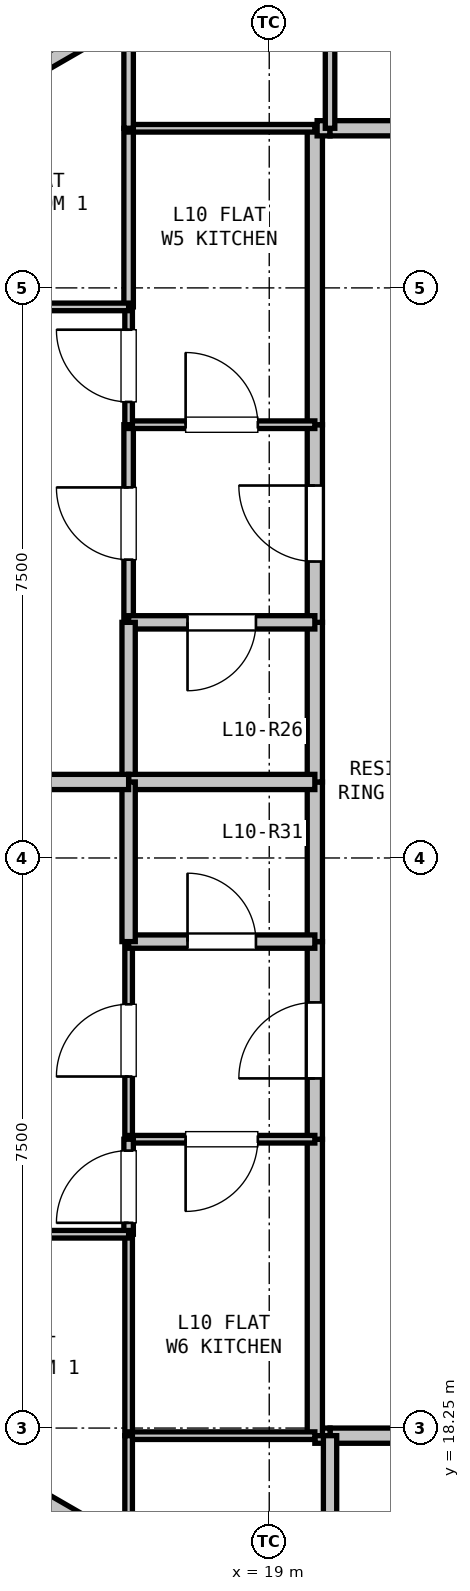
"""IFC4 building model, lengths in metres.
Left out: names, types, materials, properties, quantities, classifications, styles, units other than length and angle.
Written with IfcOpenShell. Run it as: python <this file> out.ifc"""

import sys

from ifc_helpers import new_model, si_unit, direction, frame, frame_2d, origin, place, context, subcontext, project, spatial, rectangle, extrude, element, fill, save


model = new_model("IFC4")
c1 = context("Model", 3, precision=1e-05, world=origin(), true_north=direction((0.0, 1.0)))
c2 = subcontext(c1, "Body", "Model", "MODEL_VIEW")
j1 = project(units=[si_unit("LENGTHUNIT", "METRE"), si_unit("PLANEANGLEUNIT", "RADIAN")], contexts=[c1])
p1 = place(None, origin())
s1 = spatial("IfcSite", under=j1, at=p1, CompositionType="ELEMENT")
p2 = place(p1, origin())
s2 = spatial("IfcBuilding", under=s1, at=p2, CompositionType="ELEMENT")
p3 = place(p2, frame((0.0, 0.0, 39.0)))
s3 = spatial("IfcBuildingStorey", under=s2, at=p3, CompositionType="ELEMENT", Elevation=39.0)
for number, where, z_axis, x_axis in (
    (1, (15.008, 35.611, 0.0), (0.0, 0.0, 1.0), (0.866, 0.5, 0.0)),
    (2, (16.48, 17.039, 0.0), (0.0, 0.0, 1.0), (-0.866, 0.5, 0.0)),
):
    element("IfcWall", number, at=place(p3, frame(where, z_axis=z_axis, x_axis=x_axis)), inside=s3, PredefinedType="PARAPET", context=c2, shape_type="SweptSolid", body=[
        extrude(rectangle(XDim=1.7, YDim=0.2, at=frame_2d((0.85, 0.0))), origin(), (0.0, 0.0, 1.0), 2.66),
    ])
p4 = place(p3, frame((21.8, 18.15, 0.0), z_axis=(0.0, 0.0, 1.0), x_axis=(-1.0, 0.0, 0.0)))
e3 = element("IfcWall", 3, at=p4, inside=s3, PredefinedType="PARTITIONING", context=c2, shape_type="SweptSolid", body=[
    extrude(rectangle(XDim=2.0, YDim=0.2, at=frame_2d((1.0, 0.0))), origin(), (0.0, 0.0, 1.0), 3.04),
])
p5 = place(p3, frame((19.8, 18.15, 0.0), z_axis=(0.0, 0.0, 1.0), x_axis=(-1.0, 0.0, 0.0)))
e4 = element("IfcWall", 4, at=p5, inside=s3, PredefinedType="PARTITIONING", context=c2, shape_type="SweptSolid", body=[
    extrude(rectangle(XDim=0.2, YDim=0.2, at=frame_2d((0.1, 0.0))), origin(), (0.0, 0.0, 1.0), 3.04),
])
p6 = place(p3, frame((19.6, 18.15, 0.0), z_axis=(0.0, 0.0, 1.0), x_axis=(0.0, 1.0, 0.0)))
e5 = element("IfcWall", 5, at=p6, inside=s3, PredefinedType="PARTITIONING", context=c2, shape_type="SweptSolid", body=[
    extrude(rectangle(XDim=3.9, YDim=0.2, at=frame_2d((1.95, 0.0))), origin(), (0.0, 0.0, 1.0), 2.337),
])
p7 = place(p3, frame((19.6, 22.05, 0.0), z_axis=(0.0, 0.0, 1.0), x_axis=(0.0, 1.0, 0.0)))
e6 = element("IfcWall", 6, at=p7, inside=s3, PredefinedType="PARTITIONING", context=c2, shape_type="SweptSolid", body=[
    extrude(rectangle(XDim=2.6, YDim=0.2, at=frame_2d((1.3, 0.0))), origin(), (0.0, 0.0, 1.0), 3.04),
])
p8 = place(p7, frame((0.8, 0.0, 0.0)))
e7 = element("IfcOpeningElement", 7, at=p8, cuts=e6, PredefinedType="OPENING", context=c2, shape_type="SweptSolid", body=[
    extrude(rectangle(XDim=1.0, YDim=2.15, at=frame_2d((0.5, 1.075))), frame((0.0, 0.11, 0.0), z_axis=(0.0, -1.0, 0.0), x_axis=(1.0, 0.0, 0.0)), (0.0, 0.0, 1.0), 0.22),
])
for number, where, z_axis, x_axis in (
    (8, (19.6, 24.65, 0.0), (0.0, 0.0, 1.0), (0.0, 1.0, 0.0)),
    (9, (19.6, 26.75, 0.0), (0.0, 0.0, 1.0), (0.0, 1.0, 0.0)),
):
    element("IfcWall", number, at=place(p3, frame(where, z_axis=z_axis, x_axis=x_axis)), inside=s3, PredefinedType="PARTITIONING", context=c2, shape_type="SweptSolid", body=[
        extrude(rectangle(XDim=2.1, YDim=0.2, at=frame_2d((1.05, 0.0))), origin(), (0.0, 0.0, 1.0), 3.04),
    ])
p9 = place(p3, frame((19.6, 28.85, 0.0), z_axis=(0.0, 0.0, 1.0), x_axis=(0.0, 1.0, 0.0)))
e10 = element("IfcWall", 10, at=p9, inside=s3, PredefinedType="PARTITIONING", context=c2, shape_type="SweptSolid", body=[
    extrude(rectangle(XDim=2.6, YDim=0.2, at=frame_2d((1.3, 0.0))), origin(), (0.0, 0.0, 1.0), 3.04),
])
p10 = place(p9, frame((0.8, 0.0, 0.0)))
e11 = element("IfcOpeningElement", 11, at=p10, cuts=e10, PredefinedType="OPENING", context=c2, shape_type="SweptSolid", body=[
    extrude(rectangle(XDim=1.0, YDim=2.15, at=frame_2d((0.5, 1.075))), frame((0.0, 0.11, 0.0), z_axis=(0.0, -1.0, 0.0), x_axis=(1.0, 0.0, 0.0)), (0.0, 0.0, 1.0), 0.22),
])
p11 = place(p3, frame((19.6, 31.45, 0.0), z_axis=(0.0, 0.0, 1.0), x_axis=(0.0, 1.0, 0.0)))
e12 = element("IfcWall", 12, at=p11, inside=s3, PredefinedType="PARTITIONING", context=c2, shape_type="SweptSolid", body=[
    extrude(rectangle(XDim=3.9, YDim=0.2, at=frame_2d((1.95, 0.0))), origin(), (0.0, 0.0, 1.0), 2.337),
])
p12 = place(p3, frame((19.63, 35.35, 0.0), z_axis=(0.0, 0.0, 1.0), x_axis=(1.0, 0.0, 0.0)))
e13 = element("IfcWall", 13, at=p12, inside=s3, PredefinedType="PARTITIONING", context=c2, shape_type="SweptSolid", body=[
    extrude(rectangle(XDim=0.17, YDim=0.2, at=frame_2d((0.085, 0.0))), origin(), (0.0, 0.0, 1.0), 3.04),
])
p13 = place(p3, frame((19.8, 35.35, 0.0), z_axis=(0.0, 0.0, 1.0), x_axis=(1.0, 0.0, 0.0)))
e14 = element("IfcWall", 14, at=p13, inside=s3, PredefinedType="PARTITIONING", context=c2, shape_type="SweptSolid", body=[
    extrude(rectangle(XDim=3.0, YDim=0.2, at=frame_2d((1.5, 0.0))), origin(), (0.0, 0.0, 1.0), 3.04),
])
p14 = place(p3, frame((17.15, 28.85, 0.0), z_axis=(0.0, 0.0, 1.0), x_axis=(0.0, 1.0, 0.0)))
e15 = element("IfcWall", 15, at=p14, inside=s3, PredefinedType="PARTITIONING", context=c2, shape_type="SweptSolid", body=[
    extrude(rectangle(XDim=2.6, YDim=0.125, at=frame_2d((1.3, 0.0))), origin(), (0.0, 0.0, 1.0), 3.04),
])
p15 = place(p14, frame((0.825, 0.0, 0.0)))
e16 = element("IfcOpeningElement", 16, at=p15, cuts=e15, PredefinedType="OPENING", context=c2, shape_type="SweptSolid", body=[
    extrude(rectangle(XDim=0.95, YDim=2.1, at=frame_2d((0.475, 1.05))), frame((0.0, 0.073, 0.0), z_axis=(0.0, -1.0, 0.0), x_axis=(1.0, 0.0, 0.0)), (0.0, 0.0, 1.0), 0.145),
])
p16 = place(p3, frame((17.15, 31.45, 0.0), z_axis=(0.0, 0.0, 1.0), x_axis=(1.0, 0.0, 0.0)))
e17 = element("IfcWall", 17, at=p16, inside=s3, PredefinedType="PARTITIONING", context=c2, shape_type="SweptSolid", body=[
    extrude(rectangle(XDim=2.45, YDim=0.1, at=frame_2d((1.225, 0.0))), origin(), (0.0, 0.0, 1.0), 3.04),
])
p17 = place(p16, frame((0.75, 0.0, 0.0)))
e18 = element("IfcOpeningElement", 18, at=p17, cuts=e17, PredefinedType="OPENING", context=c2, shape_type="SweptSolid", body=[
    extrude(rectangle(XDim=0.95, YDim=2.1, at=frame_2d((0.475, 1.05))), frame((0.0, 0.06, 0.0), z_axis=(0.0, -1.0, 0.0), x_axis=(1.0, 0.0, 0.0)), (0.0, 0.0, 1.0), 0.12),
])
p18 = place(p3, frame((19.6, 28.85, 0.0), z_axis=(0.0, 0.0, 1.0), x_axis=(-1.0, 0.0, 0.0)))
e19 = element("IfcWall", 19, at=p18, inside=s3, PredefinedType="PLUMBINGWALL", context=c2, shape_type="SweptSolid", body=[
    extrude(rectangle(XDim=2.45, YDim=0.175, at=frame_2d((1.225, 0.0))), origin(), (0.0, 0.0, 1.0), 3.04),
])
p19 = place(p18, frame((0.775, 0.0, 0.0)))
e20 = element("IfcOpeningElement", 20, at=p19, cuts=e19, PredefinedType="OPENING", context=c2, shape_type="SweptSolid", body=[
    extrude(rectangle(XDim=0.9, YDim=2.1, at=frame_2d((0.45, 1.05))), frame((0.0, 0.097, 0.0), z_axis=(0.0, -1.0, 0.0), x_axis=(1.0, 0.0, 0.0)), (0.0, 0.0, 1.0), 0.195),
])
p20 = place(p3, frame((17.15, 22.05, 0.0), z_axis=(0.0, 0.0, 1.0), x_axis=(0.0, 1.0, 0.0)))
e21 = element("IfcWall", 21, at=p20, inside=s3, PredefinedType="PARTITIONING", context=c2, shape_type="SweptSolid", body=[
    extrude(rectangle(XDim=2.6, YDim=0.1, at=frame_2d((1.3, 0.0))), origin(), (0.0, 0.0, 1.0), 3.04),
])
p21 = place(p20, frame((0.825, 0.0, 0.0)))
e22 = element("IfcOpeningElement", 22, at=p21, cuts=e21, PredefinedType="OPENING", context=c2, shape_type="SweptSolid", body=[
    extrude(rectangle(XDim=0.95, YDim=2.1, at=frame_2d((0.475, 1.05))), frame((0.0, 0.06, 0.0), z_axis=(0.0, -1.0, 0.0), x_axis=(1.0, 0.0, 0.0)), (0.0, 0.0, 1.0), 0.12),
])
p22 = place(p3, frame((17.15, 24.65, 0.0), z_axis=(0.0, 0.0, 1.0), x_axis=(1.0, 0.0, 0.0)))
e23 = element("IfcWall", 23, at=p22, inside=s3, PredefinedType="PLUMBINGWALL", context=c2, shape_type="SweptSolid", body=[
    extrude(rectangle(XDim=2.45, YDim=0.175, at=frame_2d((1.225, 0.0))), origin(), (0.0, 0.0, 1.0), 3.04),
])
p23 = place(p22, frame((0.775, 0.0, 0.0)))
e24 = element("IfcOpeningElement", 24, at=p23, cuts=e23, PredefinedType="OPENING", context=c2, shape_type="SweptSolid", body=[
    extrude(rectangle(XDim=0.9, YDim=2.1, at=frame_2d((0.45, 1.05))), frame((0.0, 0.097, 0.0), z_axis=(0.0, -1.0, 0.0), x_axis=(1.0, 0.0, 0.0)), (0.0, 0.0, 1.0), 0.195),
])
p24 = place(p3, frame((19.6, 22.05, 0.0), z_axis=(0.0, 0.0, 1.0), x_axis=(-1.0, 0.0, 0.0)))
e25 = element("IfcWall", 25, at=p24, inside=s3, PredefinedType="PARTITIONING", context=c2, shape_type="SweptSolid", body=[
    extrude(rectangle(XDim=2.45, YDim=0.1, at=frame_2d((1.225, 0.0))), origin(), (0.0, 0.0, 1.0), 3.04),
])
p25 = place(p24, frame((0.75, 0.0, 0.0)))
e26 = element("IfcOpeningElement", 26, at=p25, cuts=e25, PredefinedType="OPENING", context=c2, shape_type="SweptSolid", body=[
    extrude(rectangle(XDim=0.95, YDim=2.1, at=frame_2d((0.475, 1.05))), frame((0.0, 0.06, 0.0), z_axis=(0.0, -1.0, 0.0), x_axis=(1.0, 0.0, 0.0)), (0.0, 0.0, 1.0), 0.12),
])
p26 = place(p3, frame((19.8, 35.35, 0.0), z_axis=(0.0, 0.0, 1.0), x_axis=(0.0, 1.0, 0.0)))
e27 = element("IfcWall", 27, at=p26, inside=s3, PredefinedType="PARTITIONING", context=c2, shape_type="SweptSolid", body=[
    extrude(rectangle(XDim=3.194, YDim=0.125, at=frame_2d((1.597, 0.0))), origin(), (0.0, 0.0, 1.0), 2.365),
])
p27 = place(p3, frame((19.8, 14.956, 0.0), z_axis=(0.0, 0.0, 1.0), x_axis=(0.0, 1.0, 0.0)))
e28 = element("IfcWall", 28, at=p27, inside=s3, PredefinedType="PLUMBINGWALL", context=c2, shape_type="SweptSolid", body=[
    extrude(rectangle(XDim=3.194, YDim=0.175, at=frame_2d((1.597, 0.0))), origin(), (0.0, 0.0, 1.0), 2.365),
])
p28 = place(p3, frame((17.15, 26.75, 0.0), z_axis=(0.0, 0.0, 1.0), x_axis=(0.0, 1.0, 0.0)))
e29 = element("IfcWall", 29, at=p28, inside=s3, PredefinedType="PLUMBINGWALL", context=c2, shape_type="SweptSolid", body=[
    extrude(rectangle(XDim=2.1, YDim=0.175, at=frame_2d((1.05, 0.0))), origin(), (0.0, 0.0, 1.0), 3.04),
])
p29 = place(p3, frame((19.6, 26.75, 0.0), z_axis=(0.0, 0.0, 1.0), x_axis=(-1.0, 0.0, 0.0)))
e30 = element("IfcWall", 30, at=p29, inside=s3, PredefinedType="PARTITIONING", context=c2, shape_type="SweptSolid", body=[
    extrude(rectangle(XDim=2.45, YDim=0.2, at=frame_2d((1.225, 0.0))), origin(), (0.0, 0.0, 1.0), 3.04),
])
p30 = place(p3, frame((17.15, 31.45, 0.0), z_axis=(0.0, 0.0, 1.0), x_axis=(0.0, 1.0, 0.0)))
e31 = element("IfcWall", 31, at=p30, inside=s3, PredefinedType="PARTITIONING", context=c2, shape_type="SweptSolid", body=[
    extrude(rectangle(XDim=1.55, YDim=0.1, at=frame_2d((0.775, 0.0))), origin(), (0.0, 0.0, 1.0), 2.337),
])
p31 = place(p30, frame((0.3, 0.0, 0.0)))
e32 = element("IfcOpeningElement", 32, at=p31, cuts=e31, PredefinedType="OPENING", context=c2, shape_type="SweptSolid", body=[
    extrude(rectangle(XDim=0.95, YDim=2.1, at=frame_2d((0.475, 1.05))), frame((0.0, 0.06, 0.0), z_axis=(0.0, -1.0, 0.0), x_axis=(1.0, 0.0, 0.0)), (0.0, 0.0, 1.0), 0.12),
])
p32 = place(p3, frame((17.15, 33.0, 0.0), z_axis=(0.0, 0.0, 1.0), x_axis=(0.0, 1.0, 0.0)))
e33 = element("IfcWall", 33, at=p32, inside=s3, PredefinedType="PARTITIONING", context=c2, shape_type="SweptSolid", body=[
    extrude(rectangle(XDim=2.35, YDim=0.125, at=frame_2d((1.175, 0.0))), origin(), (0.0, 0.0, 1.0), 3.04),
])
p33 = place(p3, frame((17.15, 35.35, 0.0), z_axis=(0.0, 0.0, 1.0), x_axis=(1.0, 0.0, 0.0)))
e34 = element("IfcWall", 34, at=p33, inside=s3, PredefinedType="PARTITIONING", context=c2, shape_type="SweptSolid", body=[
    extrude(rectangle(XDim=2.45, YDim=0.1, at=frame_2d((1.225, 0.0))), origin(), (0.0, 0.0, 1.0), 3.04),
])
p34 = place(p3, frame((17.15, 24.65, 0.0), z_axis=(0.0, 0.0, 1.0), x_axis=(0.0, 1.0, 0.0)))
e35 = element("IfcWall", 35, at=p34, inside=s3, PredefinedType="PLUMBINGWALL", context=c2, shape_type="SweptSolid", body=[
    extrude(rectangle(XDim=2.1, YDim=0.175, at=frame_2d((1.05, 0.0))), origin(), (0.0, 0.0, 1.0), 3.04),
])
p35 = place(p3, frame((17.15, 18.15, 0.0), z_axis=(0.0, 0.0, 1.0), x_axis=(0.0, 1.0, 0.0)))
e36 = element("IfcWall", 36, at=p35, inside=s3, PredefinedType="PARTITIONING", context=c2, shape_type="SweptSolid", body=[
    extrude(rectangle(XDim=2.65, YDim=0.1, at=frame_2d((1.325, 0.0))), origin(), (0.0, 0.0, 1.0), 3.04),
])
p36 = place(p3, frame((17.15, 20.8, 0.0), z_axis=(0.0, 0.0, 1.0), x_axis=(0.0, 1.0, 0.0)))
e37 = element("IfcWall", 37, at=p36, inside=s3, PredefinedType="PARTITIONING", context=c2, shape_type="SweptSolid", body=[
    extrude(rectangle(XDim=1.25, YDim=0.125, at=frame_2d((0.625, 0.0))), origin(), (0.0, 0.0, 1.0), 2.337),
])
p37 = place(p36, frame((0.15, 0.0, 0.0)))
e38 = element("IfcOpeningElement", 38, at=p37, cuts=e37, PredefinedType="OPENING", context=c2, shape_type="SweptSolid", body=[
    extrude(rectangle(XDim=0.95, YDim=2.1, at=frame_2d((0.475, 1.05))), frame((0.0, 0.073, 0.0), z_axis=(0.0, -1.0, 0.0), x_axis=(1.0, 0.0, 0.0)), (0.0, 0.0, 1.0), 0.145),
])
p38 = place(p3, frame((19.6, 18.15, 0.0), z_axis=(0.0, 0.0, 1.0), x_axis=(-1.0, 0.0, 0.0)))
e39 = element("IfcWall", 39, at=p38, inside=s3, PredefinedType="PARTITIONING", context=c2, shape_type="SweptSolid", body=[
    extrude(rectangle(XDim=2.45, YDim=0.1, at=frame_2d((1.225, 0.0))), origin(), (0.0, 0.0, 1.0), 3.04),
])
p39 = place(p3, frame((10.419, 33.0, 0.0), z_axis=(0.0, 0.0, 1.0), x_axis=(1.0, 0.0, 0.0)))
e40 = element("IfcWall", 40, at=p39, inside=s3, PredefinedType="PARTITIONING", context=c2, shape_type="SweptSolid", body=[
    extrude(rectangle(XDim=6.731, YDim=0.1, at=frame_2d((3.365, 0.0))), origin(), (0.0, 0.0, 1.0), 2.365),
])
p40 = place(p39, frame((2.89, 0.0, 0.0)))
e41 = element("IfcOpeningElement", 41, at=p40, cuts=e40, PredefinedType="OPENING", context=c2, shape_type="SweptSolid", body=[
    extrude(rectangle(XDim=0.95, YDim=2.1, at=frame_2d((0.475, 1.05))), frame((0.0, 0.06, 0.0), z_axis=(0.0, -1.0, 0.0), x_axis=(1.0, 0.0, 0.0)), (0.0, 0.0, 1.0), 0.12),
])
p41 = place(p3, frame((17.15, 26.75, 0.0), z_axis=(0.0, 0.0, 1.0), x_axis=(-1.0, 0.0, 0.0)))
e42 = element("IfcWall", 42, at=p41, inside=s3, PredefinedType="PARTITIONING", context=c2, shape_type="SweptSolid", body=[
    extrude(rectangle(XDim=13.175, YDim=0.2, at=frame_2d((6.588, 0.0))), origin(), (0.0, 0.0, 1.0), 2.65),
])
p42 = place(p3, frame((17.15, 37.014, 0.0), z_axis=(0.0, 0.0, 1.0), x_axis=(0.0, -1.0, 0.0)))
e43 = element("IfcWall", 43, at=p42, inside=s3, PredefinedType="PARTITIONING", context=c2, shape_type="SweptSolid", body=[
    extrude(rectangle(XDim=1.664, YDim=0.125, at=frame_2d((0.832, 0.0))), origin(), (0.0, 0.0, 1.0), 2.365),
])
p43 = place(p3, frame((17.15, 20.8, 0.0), z_axis=(0.0, 0.0, 1.0), x_axis=(-1.0, 0.0, 0.0)))
e44 = element("IfcWall", 44, at=p43, inside=s3, PredefinedType="PARTITIONING", context=c2, shape_type="SweptSolid", body=[
    extrude(rectangle(XDim=7.25, YDim=0.1, at=frame_2d((3.625, 0.0))), origin(), (0.0, 0.0, 1.0), 2.365),
])
p44 = place(p43, frame((3.15, 0.0, 0.0)))
e45 = element("IfcOpeningElement", 45, at=p44, cuts=e44, PredefinedType="OPENING", context=c2, shape_type="SweptSolid", body=[
    extrude(rectangle(XDim=0.95, YDim=2.1, at=frame_2d((0.475, 1.05))), frame((0.0, 0.06, 0.0), z_axis=(0.0, -1.0, 0.0), x_axis=(1.0, 0.0, 0.0)), (0.0, 0.0, 1.0), 0.12),
])
p45 = place(p3, frame((17.15, 18.15, 0.0), z_axis=(0.0, 0.0, 1.0), x_axis=(0.0, -1.0, 0.0)))
e46 = element("IfcWall", 46, at=p45, inside=s3, PredefinedType="PARTITIONING", context=c2, shape_type="SweptSolid", body=[
    extrude(rectangle(XDim=1.664, YDim=0.1, at=frame_2d((0.832, 0.0))), origin(), (0.0, 0.0, 1.0), 2.365),
])
p46 = place(p10, origin())
e47 = element("IfcDoor", 47, at=p46, inside=s3, OperationType="SINGLE_SWING_RIGHT", PredefinedType="DOOR", context=c2, shape_type="SweptSolid", body=[
    extrude(rectangle(XDim=1.0, YDim=2.15, at=frame_2d((0.5, 1.075))), frame((0.0, 0.025, 0.0), z_axis=(0.0, -1.0, 0.0), x_axis=(1.0, 0.0, 0.0)), (0.0, 0.0, 1.0), 0.05),
])
fill(e11, e47)
p47 = place(p8, origin())
e48 = element("IfcDoor", 48, at=p47, inside=s3, OperationType="SINGLE_SWING_LEFT", PredefinedType="DOOR", context=c2, shape_type="SweptSolid", body=[
    extrude(rectangle(XDim=1.0, YDim=2.15, at=frame_2d((0.5, 1.075))), frame((0.0, 0.025, 0.0), z_axis=(0.0, -1.0, 0.0), x_axis=(1.0, 0.0, 0.0)), (0.0, 0.0, 1.0), 0.05),
])
fill(e7, e48)
p48 = place(p19, origin())
e49 = element("IfcDoor", 49, at=p48, inside=s3, OperationType="SINGLE_SWING_RIGHT", PredefinedType="DOOR", context=c2, shape_type="SweptSolid", body=[
    extrude(rectangle(XDim=0.9, YDim=2.1, at=frame_2d((0.45, 1.05))), frame((0.0, 0.025, 0.0), z_axis=(0.0, -1.0, 0.0), x_axis=(1.0, 0.0, 0.0)), (0.0, 0.0, 1.0), 0.05),
])
fill(e20, e49)
p49 = place(p17, origin())
e50 = element("IfcDoor", 50, at=p49, inside=s3, OperationType="SINGLE_SWING_LEFT", PredefinedType="DOOR", context=c2, shape_type="SweptSolid", body=[
    extrude(rectangle(XDim=0.95, YDim=2.1, at=frame_2d((0.475, 1.05))), frame((0.0, 0.025, 0.0), z_axis=(0.0, -1.0, 0.0), x_axis=(1.0, 0.0, 0.0)), (0.0, 0.0, 1.0), 0.05),
])
fill(e18, e50)
p50 = place(p15, origin())
e51 = element("IfcDoor", 51, at=p50, inside=s3, OperationType="SINGLE_SWING_RIGHT", PredefinedType="DOOR", context=c2, shape_type="SweptSolid", body=[
    extrude(rectangle(XDim=0.95, YDim=2.1, at=frame_2d((0.475, 1.05))), frame((0.0, 0.025, 0.0), z_axis=(0.0, -1.0, 0.0), x_axis=(1.0, 0.0, 0.0)), (0.0, 0.0, 1.0), 0.05),
])
fill(e16, e51)
p51 = place(p23, origin())
e52 = element("IfcDoor", 52, at=p51, inside=s3, OperationType="SINGLE_SWING_LEFT", PredefinedType="DOOR", context=c2, shape_type="SweptSolid", body=[
    extrude(rectangle(XDim=0.9, YDim=2.1, at=frame_2d((0.45, 1.05))), frame((0.0, 0.025, 0.0), z_axis=(0.0, -1.0, 0.0), x_axis=(1.0, 0.0, 0.0)), (0.0, 0.0, 1.0), 0.05),
])
fill(e24, e52)
p52 = place(p25, origin())
e53 = element("IfcDoor", 53, at=p52, inside=s3, OperationType="SINGLE_SWING_RIGHT", PredefinedType="DOOR", context=c2, shape_type="SweptSolid", body=[
    extrude(rectangle(XDim=0.95, YDim=2.1, at=frame_2d((0.475, 1.05))), frame((0.0, 0.025, 0.0), z_axis=(0.0, -1.0, 0.0), x_axis=(1.0, 0.0, 0.0)), (0.0, 0.0, 1.0), 0.05),
])
fill(e26, e53)
p53 = place(p21, origin())
e54 = element("IfcDoor", 54, at=p53, inside=s3, OperationType="SINGLE_SWING_LEFT", PredefinedType="DOOR", context=c2, shape_type="SweptSolid", body=[
    extrude(rectangle(XDim=0.95, YDim=2.1, at=frame_2d((0.475, 1.05))), frame((0.0, 0.025, 0.0), z_axis=(0.0, -1.0, 0.0), x_axis=(1.0, 0.0, 0.0)), (0.0, 0.0, 1.0), 0.05),
])
fill(e22, e54)
p54 = place(p31, origin())
e55 = element("IfcDoor", 55, at=p54, inside=s3, OperationType="SINGLE_SWING_RIGHT", PredefinedType="DOOR", context=c2, shape_type="SweptSolid", body=[
    extrude(rectangle(XDim=0.95, YDim=2.1, at=frame_2d((0.475, 1.05))), frame((0.0, 0.025, 0.0), z_axis=(0.0, -1.0, 0.0), x_axis=(1.0, 0.0, 0.0)), (0.0, 0.0, 1.0), 0.05),
])
fill(e32, e55)
p55 = place(p37, origin())
e56 = element("IfcDoor", 56, at=p55, inside=s3, OperationType="SINGLE_SWING_LEFT", PredefinedType="DOOR", context=c2, shape_type="SweptSolid", body=[
    extrude(rectangle(XDim=0.95, YDim=2.1, at=frame_2d((0.475, 1.05))), frame((0.0, 0.025, 0.0), z_axis=(0.0, -1.0, 0.0), x_axis=(1.0, 0.0, 0.0)), (0.0, 0.0, 1.0), 0.05),
])
fill(e38, e56)
save(model, sys.argv[1])
